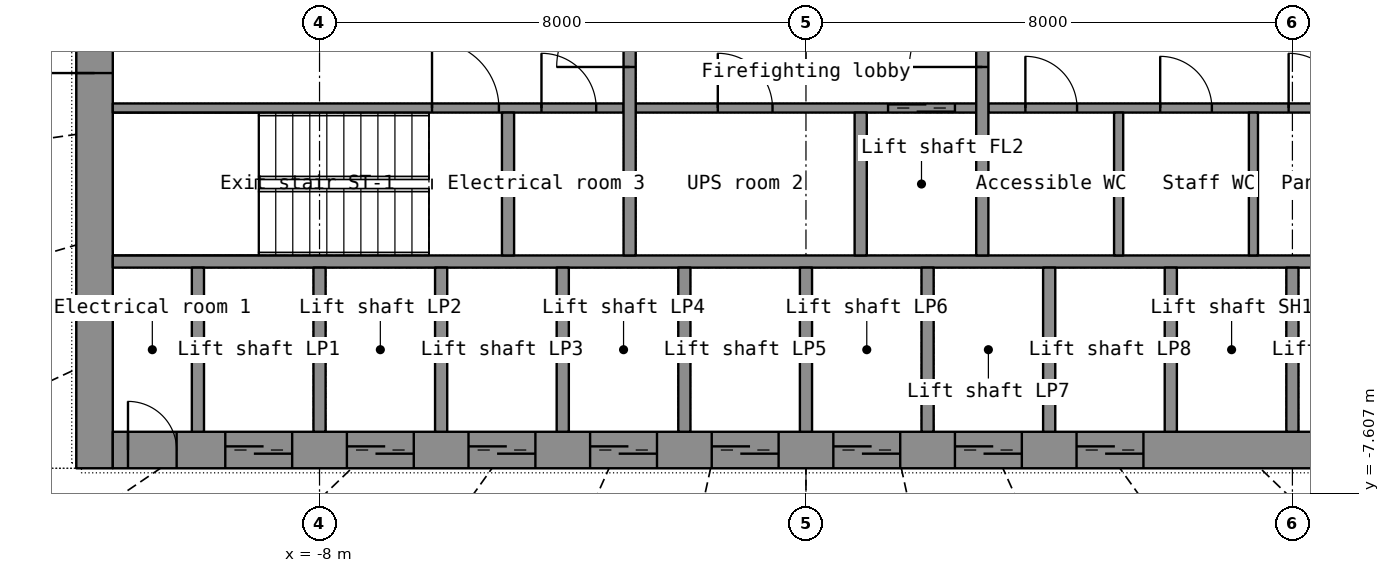
"""IFC4 building model, lengths in metres.
Left out: names, types, materials, properties, quantities, classifications, styles, units other than length and angle.
Written with IfcOpenShell. Run it as: python <this file> out.ifc"""

import sys

from ifc_helpers import new_model, si_unit, direction, frame, frame_2d, origin, place, context, subcontext, project, spatial, rectangle, extrude, element, fill, save


model = new_model("IFC4")
c1 = context("Model", 3, precision=1e-05, world=origin(), true_north=direction((0.0, 1.0)))
c2 = subcontext(c1, "Body", "Model", "MODEL_VIEW")
j1 = project(units=[si_unit("LENGTHUNIT", "METRE"), si_unit("PLANEANGLEUNIT", "RADIAN")], contexts=[c1])
p1 = place(None, origin())
s1 = spatial("IfcSite", under=j1, at=p1, CompositionType="ELEMENT")
p2 = place(p1, origin())
s2 = spatial("IfcBuilding", under=s1, at=p2, CompositionType="ELEMENT")
p3 = place(p2, frame((0.0, 0.0, 48.2)))
s3 = spatial("IfcBuildingStorey", under=s2, at=p3, CompositionType="ELEMENT", Elevation=48.2)
p4 = place(p3, frame((-11.7, -7.2, 0.0), z_axis=(0.0, 0.0, 1.0), x_axis=(0.0, 1.0, 0.0)))
e1 = element("IfcWall", 1, at=p4, inside=s3, PredefinedType="SHEAR", context=c2, shape_type="SweptSolid", body=[
    extrude(rectangle(XDim=14.4, YDim=0.6, at=frame_2d((7.2, 0.0))), origin(), (0.0, 0.0, 1.0), 3.3),
])
p5 = place(p4, frame((6.5, 0.0, 0.0)))
e2 = element("IfcOpeningElement", 2, at=p5, cuts=e1, PredefinedType="OPENING", context=c2, shape_type="SweptSolid", body=[
    extrude(rectangle(XDim=1.4, YDim=2.2, at=frame_2d((0.7, 1.1))), frame((0.0, 0.31, 0.0), z_axis=(0.0, -1.0, 0.0), x_axis=(1.0, 0.0, 0.0)), (0.0, 0.0, 1.0), 0.62),
])
p6 = place(p3, frame((-11.4, -6.9, 0.0), z_axis=(0.0, 0.0, 1.0), x_axis=(1.0, 0.0, 0.0)))
e3 = element("IfcWall", 3, at=p6, inside=s3, PredefinedType="SHEAR", context=c2, shape_type="SweptSolid", body=[
    extrude(rectangle(XDim=22.8, YDim=0.6, at=frame_2d((11.4, 0.0))), origin(), (0.0, 0.0, 1.0), 3.3),
])
p7 = place(p6, frame((1.85, 0.0, 0.0)))
e4 = element("IfcOpeningElement", 4, at=p7, cuts=e3, PredefinedType="OPENING", context=c2, shape_type="SweptSolid", body=[
    extrude(rectangle(XDim=1.1, YDim=2.2, at=frame_2d((0.55, 1.1))), frame((0.0, 0.31, 0.0), z_axis=(0.0, -1.0, 0.0), x_axis=(1.0, 0.0, 0.0)), (0.0, 0.0, 1.0), 0.62),
])
p8 = place(p6, frame((3.85, 0.0, 0.0)))
e5 = element("IfcOpeningElement", 5, at=p8, cuts=e3, PredefinedType="OPENING", context=c2, shape_type="SweptSolid", body=[
    extrude(rectangle(XDim=1.1, YDim=2.2, at=frame_2d((0.55, 1.1))), frame((0.0, 0.31, 0.0), z_axis=(0.0, -1.0, 0.0), x_axis=(1.0, 0.0, 0.0)), (0.0, 0.0, 1.0), 0.62),
])
p9 = place(p6, frame((5.85, 0.0, 0.0)))
e6 = element("IfcOpeningElement", 6, at=p9, cuts=e3, PredefinedType="OPENING", context=c2, shape_type="SweptSolid", body=[
    extrude(rectangle(XDim=1.1, YDim=2.2, at=frame_2d((0.55, 1.1))), frame((0.0, 0.31, 0.0), z_axis=(0.0, -1.0, 0.0), x_axis=(1.0, 0.0, 0.0)), (0.0, 0.0, 1.0), 0.62),
])
p10 = place(p6, frame((7.85, 0.0, 0.0)))
e7 = element("IfcOpeningElement", 7, at=p10, cuts=e3, PredefinedType="OPENING", context=c2, shape_type="SweptSolid", body=[
    extrude(rectangle(XDim=1.1, YDim=2.2, at=frame_2d((0.55, 1.1))), frame((0.0, 0.31, 0.0), z_axis=(0.0, -1.0, 0.0), x_axis=(1.0, 0.0, 0.0)), (0.0, 0.0, 1.0), 0.62),
])
p11 = place(p6, frame((9.85, 0.0, 0.0)))
e8 = element("IfcOpeningElement", 8, at=p11, cuts=e3, PredefinedType="OPENING", context=c2, shape_type="SweptSolid", body=[
    extrude(rectangle(XDim=1.1, YDim=2.2, at=frame_2d((0.55, 1.1))), frame((0.0, 0.31, 0.0), z_axis=(0.0, -1.0, 0.0), x_axis=(1.0, 0.0, 0.0)), (0.0, 0.0, 1.0), 0.62),
])
p12 = place(p6, frame((11.85, 0.0, 0.0)))
e9 = element("IfcOpeningElement", 9, at=p12, cuts=e3, PredefinedType="OPENING", context=c2, shape_type="SweptSolid", body=[
    extrude(rectangle(XDim=1.1, YDim=2.2, at=frame_2d((0.55, 1.1))), frame((0.0, 0.31, 0.0), z_axis=(0.0, -1.0, 0.0), x_axis=(1.0, 0.0, 0.0)), (0.0, 0.0, 1.0), 0.62),
])
p13 = place(p6, frame((13.85, 0.0, 0.0)))
e10 = element("IfcOpeningElement", 10, at=p13, cuts=e3, PredefinedType="OPENING", context=c2, shape_type="SweptSolid", body=[
    extrude(rectangle(XDim=1.1, YDim=2.2, at=frame_2d((0.55, 1.1))), frame((0.0, 0.31, 0.0), z_axis=(0.0, -1.0, 0.0), x_axis=(1.0, 0.0, 0.0)), (0.0, 0.0, 1.0), 0.62),
])
p14 = place(p6, frame((15.85, 0.0, 0.0)))
e11 = element("IfcOpeningElement", 11, at=p14, cuts=e3, PredefinedType="OPENING", context=c2, shape_type="SweptSolid", body=[
    extrude(rectangle(XDim=1.1, YDim=2.2, at=frame_2d((0.55, 1.1))), frame((0.0, 0.31, 0.0), z_axis=(0.0, -1.0, 0.0), x_axis=(1.0, 0.0, 0.0)), (0.0, 0.0, 1.0), 0.62),
])
p15 = place(p6, frame((19.85, 0.0, 0.0)))
e12 = element("IfcOpeningElement", 12, at=p15, cuts=e3, PredefinedType="OPENING", context=c2, shape_type="SweptSolid", body=[
    extrude(rectangle(XDim=1.1, YDim=2.2, at=frame_2d((0.55, 1.1))), frame((0.0, 0.31, 0.0), z_axis=(0.0, -1.0, 0.0), x_axis=(1.0, 0.0, 0.0)), (0.0, 0.0, 1.0), 0.62),
])
p16 = place(p6, frame((0.25, 0.0, 0.0)))
e13 = element("IfcOpeningElement", 13, at=p16, cuts=e3, PredefinedType="OPENING", context=c2, shape_type="SweptSolid", body=[
    extrude(rectangle(XDim=0.8, YDim=2.05, at=frame_2d((0.4, 1.025))), frame((0.0, 0.31, 0.0), z_axis=(0.0, -1.0, 0.0), x_axis=(1.0, 0.0, 0.0)), (0.0, 0.0, 1.0), 0.62),
])
p17 = place(p6, frame((21.75, 0.0, 0.0)))
e14 = element("IfcOpeningElement", 14, at=p17, cuts=e3, PredefinedType="OPENING", context=c2, shape_type="SweptSolid", body=[
    extrude(rectangle(XDim=0.8, YDim=2.05, at=frame_2d((0.4, 1.025))), frame((0.0, 0.31, 0.0), z_axis=(0.0, -1.0, 0.0), x_axis=(1.0, 0.0, 0.0)), (0.0, 0.0, 1.0), 0.62),
])
p18 = place(p3, frame((-11.4, -3.8, 0.0), z_axis=(0.0, 0.0, 1.0), x_axis=(1.0, 0.0, 0.0)))
e15 = element("IfcWall", 15, at=p18, inside=s3, PredefinedType="SHEAR", context=c2, shape_type="SweptSolid", body=[
    extrude(rectangle(XDim=22.8, YDim=0.2, at=frame_2d((11.4, 0.0))), origin(), (0.0, 0.0, 1.0), 3.3),
])
for number, where, z_axis, x_axis in (
    (16, (-10.0, -6.6, 0.0), (0.0, 0.0, 1.0), (0.0, 1.0, 0.0)),
    (17, (-8.0, -6.6, 0.0), (0.0, 0.0, 1.0), (0.0, 1.0, 0.0)),
    (18, (-6.0, -6.6, 0.0), (0.0, 0.0, 1.0), (0.0, 1.0, 0.0)),
    (19, (-4.0, -6.6, 0.0), (0.0, 0.0, 1.0), (0.0, 1.0, 0.0)),
    (20, (-2.0, -6.6, 0.0), (0.0, 0.0, 1.0), (0.0, 1.0, 0.0)),
    (21, (0.0, -6.6, 0.0), (0.0, 0.0, 1.0), (0.0, 1.0, 0.0)),
    (22, (2.0, -6.6, 0.0), (0.0, 0.0, 1.0), (0.0, 1.0, 0.0)),
    (23, (4.0, -6.6, 0.0), (0.0, 0.0, 1.0), (0.0, 1.0, 0.0)),
    (24, (6.0, -6.6, 0.0), (0.0, 0.0, 1.0), (0.0, 1.0, 0.0)),
    (25, (8.0, -6.6, 0.0), (0.0, 0.0, 1.0), (0.0, 1.0, 0.0)),
):
    element("IfcWall", number, at=place(p3, frame(where, z_axis=z_axis, x_axis=x_axis)), inside=s3, PredefinedType="SHEAR", context=c2, shape_type="SweptSolid", body=[
        extrude(rectangle(XDim=2.7, YDim=0.2, at=frame_2d((1.35, 0.0))), origin(), (0.0, 0.0, 1.0), 3.3),
    ])
p19 = place(p3, frame((-11.4, -1.275, 0.0), z_axis=(0.0, 0.0, 1.0), x_axis=(1.0, 0.0, 0.0)))
e26 = element("IfcWall", 26, at=p19, inside=s3, PredefinedType="SHEAR", context=c2, shape_type="SweptSolid", body=[
    extrude(rectangle(XDim=8.4, YDim=0.15, at=frame_2d((4.2, 0.0))), origin(), (0.0, 0.0, 1.0), 3.3),
])
p20 = place(p19, frame((5.25, 0.0, 0.0)))
e27 = element("IfcOpeningElement", 27, at=p20, cuts=e26, PredefinedType="OPENING", context=c2, shape_type="SweptSolid", body=[
    extrude(rectangle(XDim=1.1, YDim=2.15, at=frame_2d((0.55, 1.075))), frame((0.0, 0.085, 0.0), z_axis=(0.0, -1.0, 0.0), x_axis=(1.0, 0.0, 0.0)), (0.0, 0.0, 1.0), 0.17),
])
p21 = place(p19, frame((7.05, 0.0, 0.0)))
e28 = element("IfcOpeningElement", 28, at=p21, cuts=e26, PredefinedType="OPENING", context=c2, shape_type="SweptSolid", body=[
    extrude(rectangle(XDim=0.9, YDim=2.1, at=frame_2d((0.45, 1.05))), frame((0.0, 0.085, 0.0), z_axis=(0.0, -1.0, 0.0), x_axis=(1.0, 0.0, 0.0)), (0.0, 0.0, 1.0), 0.17),
])
p22 = place(p3, frame((-2.8, -1.275, 0.0), z_axis=(0.0, 0.0, 1.0), x_axis=(1.0, 0.0, 0.0)))
e29 = element("IfcWall", 29, at=p22, inside=s3, PredefinedType="SHEAR", context=c2, shape_type="SweptSolid", body=[
    extrude(rectangle(XDim=5.6, YDim=0.15, at=frame_2d((2.8, 0.0))), origin(), (0.0, 0.0, 1.0), 3.3),
])
p23 = place(p22, frame((4.15, 0.0, 0.0)))
e30 = element("IfcOpeningElement", 30, at=p23, cuts=e29, PredefinedType="OPENING", context=c2, shape_type="SweptSolid", body=[
    extrude(rectangle(XDim=1.1, YDim=2.2, at=frame_2d((0.55, 1.1))), frame((0.0, 0.085, 0.0), z_axis=(0.0, -1.0, 0.0), x_axis=(1.0, 0.0, 0.0)), (0.0, 0.0, 1.0), 0.17),
])
p24 = place(p22, frame((1.35, 0.0, 0.0)))
e31 = element("IfcOpeningElement", 31, at=p24, cuts=e29, PredefinedType="OPENING", context=c2, shape_type="SweptSolid", body=[
    extrude(rectangle(XDim=0.9, YDim=2.1, at=frame_2d((0.45, 1.05))), frame((0.0, 0.085, 0.0), z_axis=(0.0, -1.0, 0.0), x_axis=(1.0, 0.0, 0.0)), (0.0, 0.0, 1.0), 0.17),
])
p25 = place(p3, frame((3.0, -1.275, 0.0), z_axis=(0.0, 0.0, 1.0), x_axis=(1.0, 0.0, 0.0)))
e32 = element("IfcWall", 32, at=p25, inside=s3, PredefinedType="PARTITIONING", context=c2, shape_type="SweptSolid", body=[
    extrude(rectangle(XDim=8.4, YDim=0.15, at=frame_2d((4.2, 0.0))), origin(), (0.0, 0.0, 1.0), 3.3),
])
p26 = place(p25, frame((0.608, 0.0, 0.0)))
e33 = element("IfcOpeningElement", 33, at=p26, cuts=e32, PredefinedType="OPENING", context=c2, shape_type="SweptSolid", body=[
    extrude(rectangle(XDim=0.85, YDim=2.1, at=frame_2d((0.425, 1.05))), frame((0.0, 0.085, 0.0), z_axis=(0.0, -1.0, 0.0), x_axis=(1.0, 0.0, 0.0)), (0.0, 0.0, 1.0), 0.17),
])
p27 = place(p25, frame((2.825, 0.0, 0.0)))
e34 = element("IfcOpeningElement", 34, at=p27, cuts=e32, PredefinedType="OPENING", context=c2, shape_type="SweptSolid", body=[
    extrude(rectangle(XDim=0.85, YDim=2.1, at=frame_2d((0.425, 1.05))), frame((0.0, 0.085, 0.0), z_axis=(0.0, -1.0, 0.0), x_axis=(1.0, 0.0, 0.0)), (0.0, 0.0, 1.0), 0.17),
])
p28 = place(p25, frame((4.938, 0.0, 0.0)))
e35 = element("IfcOpeningElement", 35, at=p28, cuts=e32, PredefinedType="OPENING", context=c2, shape_type="SweptSolid", body=[
    extrude(rectangle(XDim=0.9, YDim=2.1, at=frame_2d((0.45, 1.05))), frame((0.0, 0.085, 0.0), z_axis=(0.0, -1.0, 0.0), x_axis=(1.0, 0.0, 0.0)), (0.0, 0.0, 1.0), 0.17),
])
p29 = place(p25, frame((6.996, 0.0, 0.0)))
e36 = element("IfcOpeningElement", 36, at=p29, cuts=e32, PredefinedType="OPENING", context=c2, shape_type="SweptSolid", body=[
    extrude(rectangle(XDim=0.9, YDim=2.1, at=frame_2d((0.45, 1.05))), frame((0.0, 0.085, 0.0), z_axis=(0.0, -1.0, 0.0), x_axis=(1.0, 0.0, 0.0)), (0.0, 0.0, 1.0), 0.17),
])
p30 = place(p3, frame((-2.9, -3.7, 0.0), z_axis=(0.0, 0.0, 1.0), x_axis=(0.0, 1.0, 0.0)))
e37 = element("IfcWall", 37, at=p30, inside=s3, PredefinedType="SHEAR", context=c2, shape_type="SweptSolid", body=[
    extrude(rectangle(XDim=7.4, YDim=0.2, at=frame_2d((3.7, 0.0))), origin(), (0.0, 0.0, 1.0), 3.3),
])
p31 = place(p30, frame((3.1, 0.0, 0.0)))
e38 = element("IfcOpeningElement", 38, at=p31, cuts=e37, PredefinedType="OPENING", context=c2, shape_type="SweptSolid", body=[
    extrude(rectangle(XDim=1.2, YDim=2.2, at=frame_2d((0.6, 1.1))), frame((0.0, 0.11, 0.0), z_axis=(0.0, -1.0, 0.0), x_axis=(1.0, 0.0, 0.0)), (0.0, 0.0, 1.0), 0.22),
])
p32 = place(p3, frame((2.9, -3.7, 0.0), z_axis=(0.0, 0.0, 1.0), x_axis=(0.0, 1.0, 0.0)))
e39 = element("IfcWall", 39, at=p32, inside=s3, PredefinedType="SHEAR", context=c2, shape_type="SweptSolid", body=[
    extrude(rectangle(XDim=7.4, YDim=0.2, at=frame_2d((3.7, 0.0))), origin(), (0.0, 0.0, 1.0), 3.3),
])
p33 = place(p32, frame((3.1, 0.0, 0.0)))
e40 = element("IfcOpeningElement", 40, at=p33, cuts=e39, PredefinedType="OPENING", context=c2, shape_type="SweptSolid", body=[
    extrude(rectangle(XDim=1.2, YDim=2.2, at=frame_2d((0.6, 1.1))), frame((0.0, 0.11, 0.0), z_axis=(0.0, -1.0, 0.0), x_axis=(1.0, 0.0, 0.0)), (0.0, 0.0, 1.0), 0.22),
])
for number, where, z_axis, x_axis in (
    (41, (0.9, -3.7, 0.0), (0.0, 0.0, 1.0), (0.0, 1.0, 0.0)),
    (42, (-4.9, -3.7, 0.0), (0.0, 0.0, 1.0), (0.0, 1.0, 0.0)),
):
    element("IfcWall", number, at=place(p3, frame(where, z_axis=z_axis, x_axis=x_axis)), inside=s3, PredefinedType="SHEAR", context=c2, shape_type="SweptSolid", body=[
        extrude(rectangle(XDim=2.35, YDim=0.2, at=frame_2d((1.175, 0.0))), origin(), (0.0, 0.0, 1.0), 3.3),
    ])
for number, where, z_axis, x_axis in (
    (43, (5.142, -3.7, 0.0), (0.0, 0.0, 1.0), (0.0, 1.0, 0.0)),
    (44, (7.359, -3.7, 0.0), (0.0, 0.0, 1.0), (0.0, 1.0, 0.0)),
):
    element("IfcWall", number, at=place(p3, frame(where, z_axis=z_axis, x_axis=x_axis)), inside=s3, PredefinedType="PARTITIONING", context=c2, shape_type="SweptSolid", body=[
        extrude(rectangle(XDim=2.35, YDim=0.15, at=frame_2d((1.175, 0.0))), origin(), (0.0, 0.0, 1.0), 3.3),
    ])
p34 = place(p7, origin())
e45 = element("IfcDoor", 45, at=p34, inside=s3, OperationType="DOUBLE_DOOR_SLIDING", PredefinedType="DOOR", context=c2, shape_type="SweptSolid", body=[
    extrude(rectangle(XDim=1.1, YDim=2.2, at=frame_2d((0.55, 1.1))), frame((0.0, 0.025, 0.0), z_axis=(0.0, -1.0, 0.0), x_axis=(1.0, 0.0, 0.0)), (0.0, 0.0, 1.0), 0.05),
])
fill(e4, e45)
p35 = place(p8, origin())
e46 = element("IfcDoor", 46, at=p35, inside=s3, OperationType="DOUBLE_DOOR_SLIDING", PredefinedType="DOOR", context=c2, shape_type="SweptSolid", body=[
    extrude(rectangle(XDim=1.1, YDim=2.2, at=frame_2d((0.55, 1.1))), frame((0.0, 0.025, 0.0), z_axis=(0.0, -1.0, 0.0), x_axis=(1.0, 0.0, 0.0)), (0.0, 0.0, 1.0), 0.05),
])
fill(e5, e46)
p36 = place(p9, origin())
e47 = element("IfcDoor", 47, at=p36, inside=s3, OperationType="DOUBLE_DOOR_SLIDING", PredefinedType="DOOR", context=c2, shape_type="SweptSolid", body=[
    extrude(rectangle(XDim=1.1, YDim=2.2, at=frame_2d((0.55, 1.1))), frame((0.0, 0.025, 0.0), z_axis=(0.0, -1.0, 0.0), x_axis=(1.0, 0.0, 0.0)), (0.0, 0.0, 1.0), 0.05),
])
fill(e6, e47)
p37 = place(p10, origin())
e48 = element("IfcDoor", 48, at=p37, inside=s3, OperationType="DOUBLE_DOOR_SLIDING", PredefinedType="DOOR", context=c2, shape_type="SweptSolid", body=[
    extrude(rectangle(XDim=1.1, YDim=2.2, at=frame_2d((0.55, 1.1))), frame((0.0, 0.025, 0.0), z_axis=(0.0, -1.0, 0.0), x_axis=(1.0, 0.0, 0.0)), (0.0, 0.0, 1.0), 0.05),
])
fill(e7, e48)
p38 = place(p11, origin())
e49 = element("IfcDoor", 49, at=p38, inside=s3, OperationType="DOUBLE_DOOR_SLIDING", PredefinedType="DOOR", context=c2, shape_type="SweptSolid", body=[
    extrude(rectangle(XDim=1.1, YDim=2.2, at=frame_2d((0.55, 1.1))), frame((0.0, 0.025, 0.0), z_axis=(0.0, -1.0, 0.0), x_axis=(1.0, 0.0, 0.0)), (0.0, 0.0, 1.0), 0.05),
])
fill(e8, e49)
p39 = place(p12, origin())
e50 = element("IfcDoor", 50, at=p39, inside=s3, OperationType="DOUBLE_DOOR_SLIDING", PredefinedType="DOOR", context=c2, shape_type="SweptSolid", body=[
    extrude(rectangle(XDim=1.1, YDim=2.2, at=frame_2d((0.55, 1.1))), frame((0.0, 0.025, 0.0), z_axis=(0.0, -1.0, 0.0), x_axis=(1.0, 0.0, 0.0)), (0.0, 0.0, 1.0), 0.05),
])
fill(e9, e50)
p40 = place(p13, origin())
e51 = element("IfcDoor", 51, at=p40, inside=s3, OperationType="DOUBLE_DOOR_SLIDING", PredefinedType="DOOR", context=c2, shape_type="SweptSolid", body=[
    extrude(rectangle(XDim=1.1, YDim=2.2, at=frame_2d((0.55, 1.1))), frame((0.0, 0.025, 0.0), z_axis=(0.0, -1.0, 0.0), x_axis=(1.0, 0.0, 0.0)), (0.0, 0.0, 1.0), 0.05),
])
fill(e10, e51)
p41 = place(p14, origin())
e52 = element("IfcDoor", 52, at=p41, inside=s3, OperationType="DOUBLE_DOOR_SLIDING", PredefinedType="DOOR", context=c2, shape_type="SweptSolid", body=[
    extrude(rectangle(XDim=1.1, YDim=2.2, at=frame_2d((0.55, 1.1))), frame((0.0, 0.025, 0.0), z_axis=(0.0, -1.0, 0.0), x_axis=(1.0, 0.0, 0.0)), (0.0, 0.0, 1.0), 0.05),
])
fill(e11, e52)
p42 = place(p16, origin())
e53 = element("IfcDoor", 53, at=p42, inside=s3, OperationType="SINGLE_SWING_LEFT", PredefinedType="DOOR", context=c2, shape_type="SweptSolid", body=[
    extrude(rectangle(XDim=0.8, YDim=2.05, at=frame_2d((0.4, 1.025))), frame((0.0, 0.025, 0.0), z_axis=(0.0, -1.0, 0.0), x_axis=(1.0, 0.0, 0.0)), (0.0, 0.0, 1.0), 0.05),
])
fill(e13, e53)
p43 = place(p5, origin())
e54 = element("IfcDoor", 54, at=p43, inside=s3, OperationType="DOUBLE_DOOR_SINGLE_SWING", PredefinedType="DOOR", context=c2, shape_type="SweptSolid", body=[
    extrude(rectangle(XDim=1.4, YDim=2.2, at=frame_2d((0.7, 1.1))), frame((0.0, 0.025, 0.0), z_axis=(0.0, -1.0, 0.0), x_axis=(1.0, 0.0, 0.0)), (0.0, 0.0, 1.0), 0.05),
])
fill(e2, e54)
p44 = place(p31, origin())
e55 = element("IfcDoor", 55, at=p44, inside=s3, OperationType="SINGLE_SWING_LEFT", PredefinedType="DOOR", context=c2, shape_type="SweptSolid", body=[
    extrude(rectangle(XDim=1.2, YDim=2.2, at=frame_2d((0.6, 1.1))), frame((0.0, 0.025, 0.0), z_axis=(0.0, -1.0, 0.0), x_axis=(1.0, 0.0, 0.0)), (0.0, 0.0, 1.0), 0.05),
])
fill(e38, e55)
p45 = place(p33, origin())
e56 = element("IfcDoor", 56, at=p45, inside=s3, OperationType="SINGLE_SWING_LEFT", PredefinedType="DOOR", context=c2, shape_type="SweptSolid", body=[
    extrude(rectangle(XDim=1.2, YDim=2.2, at=frame_2d((0.6, 1.1))), frame((0.0, 0.025, 0.0), z_axis=(0.0, -1.0, 0.0), x_axis=(1.0, 0.0, 0.0)), (0.0, 0.0, 1.0), 0.05),
])
fill(e40, e56)
p46 = place(p23, origin())
e57 = element("IfcDoor", 57, at=p46, inside=s3, OperationType="DOUBLE_DOOR_SLIDING", PredefinedType="DOOR", context=c2, shape_type="SweptSolid", body=[
    extrude(rectangle(XDim=1.1, YDim=2.2, at=frame_2d((0.55, 1.1))), frame((0.0, 0.025, 0.0), z_axis=(0.0, -1.0, 0.0), x_axis=(1.0, 0.0, 0.0)), (0.0, 0.0, 1.0), 0.05),
])
fill(e30, e57)
p47 = place(p20, origin())
e58 = element("IfcDoor", 58, at=p47, inside=s3, OperationType="SINGLE_SWING_LEFT", PredefinedType="DOOR", context=c2, shape_type="SweptSolid", body=[
    extrude(rectangle(XDim=1.1, YDim=2.15, at=frame_2d((0.55, 1.075))), frame((0.0, 0.025, 0.0), z_axis=(0.0, -1.0, 0.0), x_axis=(1.0, 0.0, 0.0)), (0.0, 0.0, 1.0), 0.05),
])
fill(e27, e58)
p48 = place(p26, origin())
e59 = element("IfcDoor", 59, at=p48, inside=s3, OperationType="SINGLE_SWING_LEFT", PredefinedType="DOOR", context=c2, shape_type="SweptSolid", body=[
    extrude(rectangle(XDim=0.85, YDim=2.1, at=frame_2d((0.425, 1.05))), frame((0.0, 0.025, 0.0), z_axis=(0.0, -1.0, 0.0), x_axis=(1.0, 0.0, 0.0)), (0.0, 0.0, 1.0), 0.05),
])
fill(e33, e59)
p49 = place(p27, origin())
e60 = element("IfcDoor", 60, at=p49, inside=s3, OperationType="SINGLE_SWING_LEFT", PredefinedType="DOOR", context=c2, shape_type="SweptSolid", body=[
    extrude(rectangle(XDim=0.85, YDim=2.1, at=frame_2d((0.425, 1.05))), frame((0.0, 0.025, 0.0), z_axis=(0.0, -1.0, 0.0), x_axis=(1.0, 0.0, 0.0)), (0.0, 0.0, 1.0), 0.05),
])
fill(e34, e60)
p50 = place(p28, origin())
e61 = element("IfcDoor", 61, at=p50, inside=s3, OperationType="SINGLE_SWING_LEFT", PredefinedType="DOOR", context=c2, shape_type="SweptSolid", body=[
    extrude(rectangle(XDim=0.9, YDim=2.1, at=frame_2d((0.45, 1.05))), frame((0.0, 0.025, 0.0), z_axis=(0.0, -1.0, 0.0), x_axis=(1.0, 0.0, 0.0)), (0.0, 0.0, 1.0), 0.05),
])
fill(e35, e61)
p51 = place(p24, origin())
e62 = element("IfcDoor", 62, at=p51, inside=s3, OperationType="SINGLE_SWING_LEFT", PredefinedType="DOOR", context=c2, shape_type="SweptSolid", body=[
    extrude(rectangle(XDim=0.9, YDim=2.1, at=frame_2d((0.45, 1.05))), frame((0.0, 0.025, 0.0), z_axis=(0.0, -1.0, 0.0), x_axis=(1.0, 0.0, 0.0)), (0.0, 0.0, 1.0), 0.05),
])
fill(e31, e62)
p52 = place(p21, origin())
e63 = element("IfcDoor", 63, at=p52, inside=s3, OperationType="SINGLE_SWING_LEFT", PredefinedType="DOOR", context=c2, shape_type="SweptSolid", body=[
    extrude(rectangle(XDim=0.9, YDim=2.1, at=frame_2d((0.45, 1.05))), frame((0.0, 0.025, 0.0), z_axis=(0.0, -1.0, 0.0), x_axis=(1.0, 0.0, 0.0)), (0.0, 0.0, 1.0), 0.05),
])
fill(e28, e63)
save(model, sys.argv[1])
